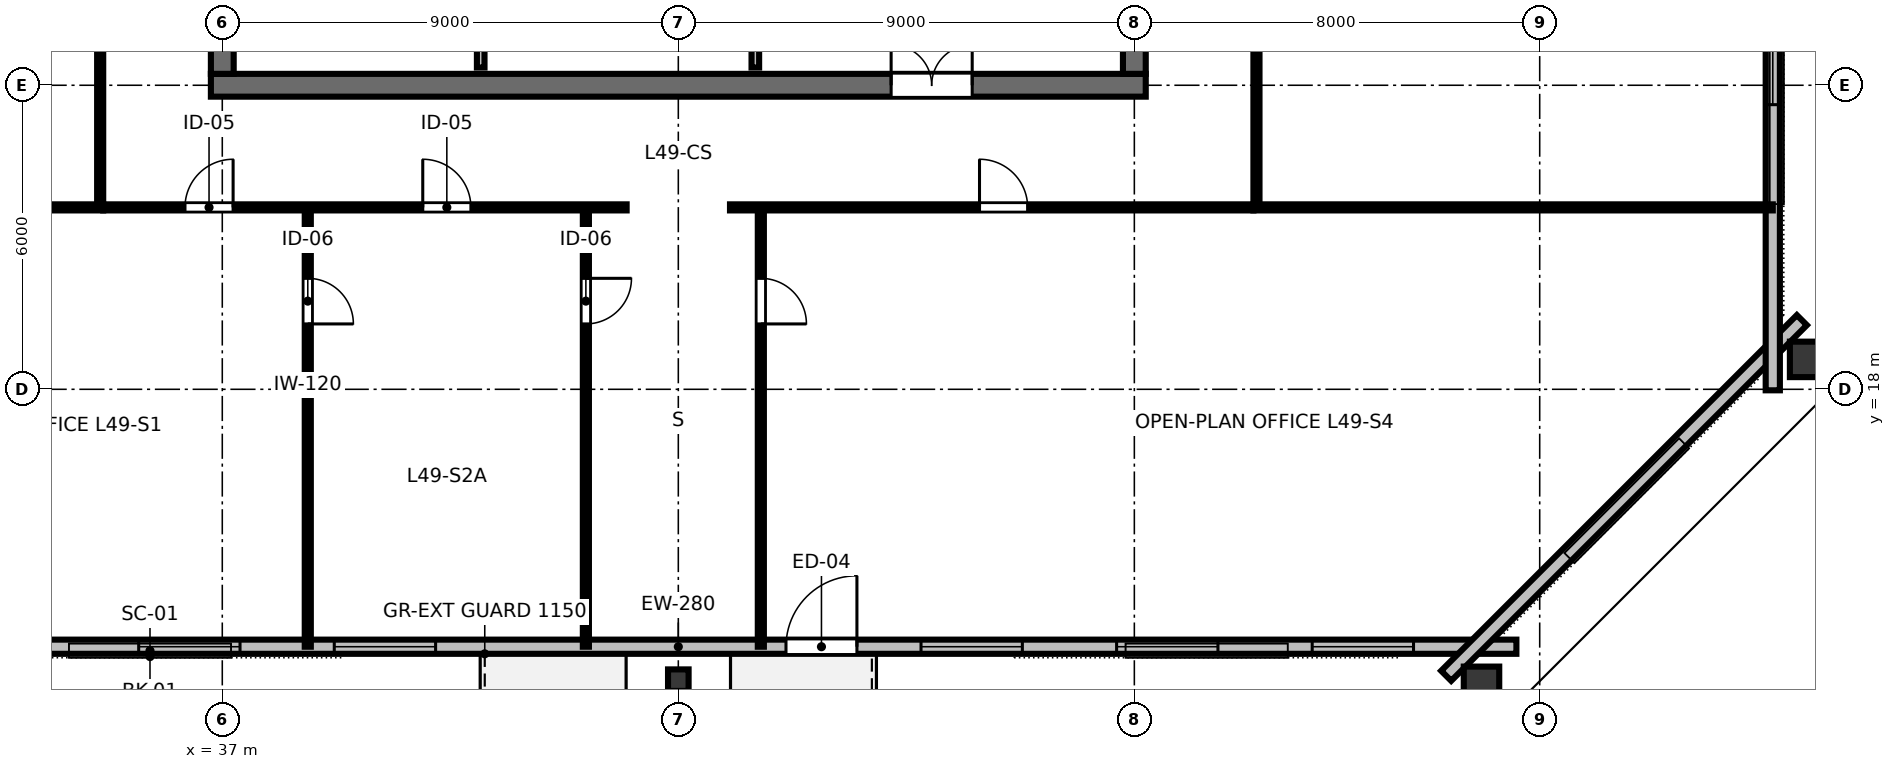
"""IFC4 building model, lengths in metres.
Left out: names, types, materials, properties, quantities, classifications, styles, units other than length and angle.
Written with IfcOpenShell. Run it as: python <this file> out.ifc"""

import sys

from ifc_helpers import new_model, si_unit, direction, frame, frame_2d, origin, origin_2d, place, context, subcontext, project, spatial, rectangle, hollow_rectangle, i_section, extrude, element, fill, save


model = new_model("IFC4")
c1 = context("Model", 3, precision=1e-05, world=origin(), true_north=direction((0.0, 1.0)))
c2 = subcontext(c1, "Body", "Model", "MODEL_VIEW")
j1 = project(units=[si_unit("LENGTHUNIT", "METRE"), si_unit("PLANEANGLEUNIT", "RADIAN")], contexts=[c1])
p1 = place(None, origin())
s1 = spatial("IfcSite", under=j1, at=p1, CompositionType="ELEMENT")
p2 = place(p1, origin())
s2 = spatial("IfcBuilding", under=s1, at=p2, CompositionType="ELEMENT")
p3 = place(p2, frame((0.0, 0.0, 187.8)))
s3 = spatial("IfcBuildingStorey", under=s2, at=p3, CompositionType="ELEMENT", Elevation=187.8)
p4 = place(p3, frame((36.775, 24.0, 0.0), z_axis=(0.0, 0.0, 1.0), x_axis=(1.0, 0.0, 0.0)))
e1 = element("IfcWall", 1, at=p4, inside=s3, PredefinedType="SHEAR", context=c2, shape_type="SweptSolid", body=[
    extrude(rectangle(XDim=18.45, YDim=0.45, at=frame_2d((9.225, 0.0))), origin(), (0.0, 0.0, 1.0), 3.36),
])
p5 = place(p4, frame((13.425, 0.0, 0.0)))
e2 = element("IfcOpeningElement", 2, at=p5, cuts=e1, PredefinedType="OPENING", context=c2, shape_type="SweptSolid", body=[
    extrude(rectangle(XDim=1.6, YDim=2.15, at=frame_2d((0.8, 1.075))), frame((0.0, 0.235, 0.0), z_axis=(0.0, -1.0, 0.0), x_axis=(1.0, 0.0, 0.0)), (0.0, 0.0, 1.0), 0.47),
])
p6 = place(p3, frame((37.0, 24.225, 0.0), z_axis=(0.0, 0.0, 1.0), x_axis=(0.0, 1.0, 0.0)))
e3 = element("IfcWall", 3, at=p6, inside=s3, PredefinedType="SHEAR", context=c2, shape_type="SweptSolid", body=[
    extrude(rectangle(XDim=15.55, YDim=0.45, at=frame_2d((7.775, 0.0))), origin(), (0.0, 0.0, 1.0), 3.36),
])
p7 = place(p6, frame((5.3, 0.0, 0.0)))
e4 = element("IfcOpeningElement", 4, at=p7, cuts=e3, PredefinedType="OPENING", context=c2, shape_type="SweptSolid", body=[
    extrude(rectangle(XDim=1.15, YDim=2.15, at=frame_2d((0.575, 1.075))), frame((0.0, 0.235, 0.0), z_axis=(0.0, -1.0, 0.0), x_axis=(1.0, 0.0, 0.0)), (0.0, 0.0, 1.0), 0.47),
])
p8 = place(p3, frame((55.0, 24.225, 0.0), z_axis=(0.0, 0.0, 1.0), x_axis=(0.0, 1.0, 0.0)))
e5 = element("IfcWall", 5, at=p8, inside=s3, PredefinedType="SHEAR", context=c2, shape_type="SweptSolid", body=[
    extrude(rectangle(XDim=15.55, YDim=0.45, at=frame_2d((7.775, 0.0))), origin(), (0.0, 0.0, 1.0), 3.36),
])
p9 = place(p8, frame((5.3, 0.0, 0.0)))
e6 = element("IfcOpeningElement", 6, at=p9, cuts=e5, PredefinedType="OPENING", context=c2, shape_type="SweptSolid", body=[
    extrude(rectangle(XDim=1.15, YDim=2.15, at=frame_2d((0.575, 1.075))), frame((0.0, 0.235, 0.0), z_axis=(0.0, -1.0, 0.0), x_axis=(1.0, 0.0, 0.0)), (0.0, 0.0, 1.0), 0.47),
])
p10 = place(p3, frame((46.0, 12.26, 0.0), z_axis=(0.0, 0.0, 1.0), x_axis=(1.0, 0.0, 0.0)))
e7 = element("IfcColumn", 7, at=p10, inside=s3, PredefinedType="COLUMN", context=c2, shape_type="SweptSolid", body=[
    extrude(i_section(OverallWidth=0.406, OverallDepth=0.425, WebThickness=0.033, FlangeThickness=0.052, FilletRadius=0.025, at=origin_2d()), origin(), (0.0, 0.0, 1.0), 3.373),
])
for number, where, z_axis, x_axis in (
    (8, (61.851, 12.103, 0.0), (0.0, 0.0, 1.0), (1.0, 0.0, 0.0)),
    (9, (68.363, 18.59, 0.0), (0.0, 0.0, 1.0), (0.0, 1.0, 0.0)),
):
    element("IfcColumn", number, at=place(p3, frame(where, z_axis=z_axis, x_axis=x_axis)), inside=s3, PredefinedType="COLUMN", context=c2, shape_type="SweptSolid", body=[
        extrude(hollow_rectangle(XDim=0.7, YDim=0.85, WallThickness=0.04, at=origin_2d()), origin(), (0.0, 0.0, 1.0), 3.373),
    ])
p11 = place(p3, frame((29.46, 12.92, 0.0), z_axis=(0.0, 0.0, 1.0), x_axis=(1.0, 0.0, 0.0)))
e10 = element("IfcWall", 10, at=p11, inside=s3, PredefinedType="STANDARD", context=c2, shape_type="SweptSolid", body=[
    extrude(rectangle(XDim=33.08, YDim=0.28, at=frame_2d((16.54, 0.0))), origin(), (0.0, 0.0, 1.0), 3.375),
])
p12 = place(p11, frame((18.665, 0.0, 0.0)))
e11 = element("IfcOpeningElement", 11, at=p12, cuts=e10, PredefinedType="OPENING", context=c2, shape_type="SweptSolid", body=[
    extrude(rectangle(XDim=1.4, YDim=2.15, at=frame_2d((0.7, 1.075))), frame((0.0, 0.15, 0.0), z_axis=(0.0, -1.0, 0.0), x_axis=(1.0, 0.0, 0.0)), (0.0, 0.0, 1.0), 0.3),
])
p13 = place(p11, frame((2.03, 0.0, 0.8)))
e12 = element("IfcOpeningElement", 12, at=p13, cuts=e10, PredefinedType="OPENING", context=c2, shape_type="SweptSolid", body=[
    extrude(rectangle(XDim=2.0, YDim=1.95, at=frame_2d((1.0, 0.975))), frame((0.0, 0.15, 0.0), z_axis=(0.0, -1.0, 0.0), x_axis=(1.0, 0.0, 0.0)), (0.0, 0.0, 1.0), 0.3),
])
p14 = place(p11, frame((5.89, 0.0, 0.8)))
e13 = element("IfcOpeningElement", 13, at=p14, cuts=e10, PredefinedType="OPENING", context=c2, shape_type="SweptSolid", body=[
    extrude(rectangle(XDim=2.0, YDim=1.95, at=frame_2d((1.0, 0.975))), frame((0.0, 0.15, 0.0), z_axis=(0.0, -1.0, 0.0), x_axis=(1.0, 0.0, 0.0)), (0.0, 0.0, 1.0), 0.3),
])
p15 = place(p11, frame((9.75, 0.0, 0.8)))
e14 = element("IfcOpeningElement", 14, at=p15, cuts=e10, PredefinedType="OPENING", context=c2, shape_type="SweptSolid", body=[
    extrude(rectangle(XDim=2.0, YDim=1.95, at=frame_2d((1.0, 0.975))), frame((0.0, 0.15, 0.0), z_axis=(0.0, -1.0, 0.0), x_axis=(1.0, 0.0, 0.0)), (0.0, 0.0, 1.0), 0.3),
])
p16 = place(p11, frame((21.33, 0.0, 0.8)))
e15 = element("IfcOpeningElement", 15, at=p16, cuts=e10, PredefinedType="OPENING", context=c2, shape_type="SweptSolid", body=[
    extrude(rectangle(XDim=2.0, YDim=1.95, at=frame_2d((1.0, 0.975))), frame((0.0, 0.15, 0.0), z_axis=(0.0, -1.0, 0.0), x_axis=(1.0, 0.0, 0.0)), (0.0, 0.0, 1.0), 0.3),
])
p17 = place(p11, frame((25.19, 0.0, 0.8)))
e16 = element("IfcOpeningElement", 16, at=p17, cuts=e10, PredefinedType="OPENING", context=c2, shape_type="SweptSolid", body=[
    extrude(rectangle(XDim=2.0, YDim=1.95, at=frame_2d((1.0, 0.975))), frame((0.0, 0.15, 0.0), z_axis=(0.0, -1.0, 0.0), x_axis=(1.0, 0.0, 0.0)), (0.0, 0.0, 1.0), 0.3),
])
p18 = place(p11, frame((29.05, 0.0, 0.8)))
e17 = element("IfcOpeningElement", 17, at=p18, cuts=e10, PredefinedType="OPENING", context=c2, shape_type="SweptSolid", body=[
    extrude(rectangle(XDim=2.0, YDim=1.95, at=frame_2d((1.0, 0.975))), frame((0.0, 0.15, 0.0), z_axis=(0.0, -1.0, 0.0), x_axis=(1.0, 0.0, 0.0)), (0.0, 0.0, 1.0), 0.3),
])
p19 = place(p3, frame((61.155, 12.346, 0.0), z_axis=(0.0, 0.0, 1.0), x_axis=(0.707106781187, 0.707106781187, 0.0)))
e18 = element("IfcWall", 18, at=p19, inside=s3, PredefinedType="STANDARD", context=c2, shape_type="SweptSolid", body=[
    extrude(rectangle(XDim=9.927, YDim=0.28, at=frame_2d((4.963, 0.0))), origin(), (0.0, 0.0, 1.0), 3.375),
])
p20 = place(p3, frame((67.6, 17.98, 0.0), z_axis=(0.0, 0.0, 1.0), x_axis=(0.0, 1.0, 0.0)))
e19 = element("IfcWall", 19, at=p20, inside=s3, PredefinedType="STANDARD", context=c2, shape_type="SweptSolid", body=[
    extrude(rectangle(XDim=28.04, YDim=0.28, at=frame_2d((14.02, 0.0))), origin(), (0.0, 0.0, 1.0), 3.375),
])
p21 = place(p20, frame((5.637, 0.0, 0.8)))
e20 = element("IfcOpeningElement", 20, at=p21, cuts=e19, PredefinedType="OPENING", context=c2, shape_type="SweptSolid", body=[
    extrude(rectangle(XDim=2.0, YDim=1.95, at=frame_2d((1.0, 0.975))), frame((0.0, 0.15, 0.0), z_axis=(0.0, -1.0, 0.0), x_axis=(1.0, 0.0, 0.0)), (0.0, 0.0, 1.0), 0.3),
])
p22 = place(p20, frame((9.329, 0.0, 0.8)))
e21 = element("IfcOpeningElement", 21, at=p22, cuts=e19, PredefinedType="OPENING", context=c2, shape_type="SweptSolid", body=[
    extrude(rectangle(XDim=2.0, YDim=1.95, at=frame_2d((1.0, 0.975))), frame((0.0, 0.15, 0.0), z_axis=(0.0, -1.0, 0.0), x_axis=(1.0, 0.0, 0.0)), (0.0, 0.0, 1.0), 0.3),
])
p23 = place(p20, frame((16.711, 0.0, 0.8)))
e22 = element("IfcOpeningElement", 22, at=p23, cuts=e19, PredefinedType="OPENING", context=c2, shape_type="SweptSolid", body=[
    extrude(rectangle(XDim=2.0, YDim=1.95, at=frame_2d((1.0, 0.975))), frame((0.0, 0.15, 0.0), z_axis=(0.0, -1.0, 0.0), x_axis=(1.0, 0.0, 0.0)), (0.0, 0.0, 1.0), 0.3),
])
p24 = place(p20, frame((20.403, 0.0, 0.8)))
e23 = element("IfcOpeningElement", 23, at=p24, cuts=e19, PredefinedType="OPENING", context=c2, shape_type="SweptSolid", body=[
    extrude(rectangle(XDim=2.0, YDim=1.95, at=frame_2d((1.0, 0.975))), frame((0.0, 0.15, 0.0), z_axis=(0.0, -1.0, 0.0), x_axis=(1.0, 0.0, 0.0)), (0.0, 0.0, 1.0), 0.3),
])
p25 = place(p3, frame((42.1, 24.35, 0.0), z_axis=(0.0, 0.0, 1.0), x_axis=(0.0, 1.0, 0.0)))
e24 = element("IfcWall", 24, at=p25, inside=s3, PredefinedType="PARTITIONING", context=c2, shape_type="SweptSolid", body=[
    extrude(rectangle(XDim=3.9, YDim=0.15, at=frame_2d((1.95, 0.0))), origin(), (0.0, 0.0, 1.0), 3.375),
])
p26 = place(p25, frame((1.5, 0.0, 0.0)))
e25 = element("IfcOpeningElement", 25, at=p26, cuts=e24, PredefinedType="OPENING", context=c2, shape_type="SweptSolid", body=[
    extrude(rectangle(XDim=0.9, YDim=2.15, at=frame_2d((0.45, 1.075))), frame((0.0, 0.085, 0.0), z_axis=(0.0, -1.0, 0.0), x_axis=(1.0, 0.0, 0.0)), (0.0, 0.0, 1.0), 0.17),
])
p27 = place(p3, frame((47.52, 24.35, 0.0), z_axis=(0.0, 0.0, 1.0), x_axis=(0.0, 1.0, 0.0)))
e26 = element("IfcWall", 26, at=p27, inside=s3, PredefinedType="PARTITIONING", context=c2, shape_type="SweptSolid", body=[
    extrude(rectangle(XDim=3.9, YDim=0.15, at=frame_2d((1.95, 0.0))), origin(), (0.0, 0.0, 1.0), 3.375),
])
p28 = place(p27, frame((0.35, 0.0, 0.0)))
e27 = element("IfcOpeningElement", 27, at=p28, cuts=e26, PredefinedType="OPENING", context=c2, shape_type="SweptSolid", body=[
    extrude(rectangle(XDim=0.9, YDim=2.15, at=frame_2d((0.45, 1.075))), frame((0.0, 0.085, 0.0), z_axis=(0.0, -1.0, 0.0), x_axis=(1.0, 0.0, 0.0)), (0.0, 0.0, 1.0), 0.17),
])
p29 = place(p3, frame((38.687, 21.59, 0.0), z_axis=(0.0, 0.0, 1.0), x_axis=(0.0, -1.0, 0.0)))
e28 = element("IfcWall", 28, at=p29, inside=s3, PredefinedType="PARTITIONING", context=c2, shape_type="SweptSolid", body=[
    extrude(rectangle(XDim=8.67, YDim=0.12, at=frame_2d((4.335, 0.0))), origin(), (0.0, 0.0, 1.0), 2.655),
])
p30 = place(p29, frame((1.4, 0.0, 0.0)))
e29 = element("IfcOpeningElement", 29, at=p30, cuts=e28, PredefinedType="OPENING", context=c2, shape_type="SweptSolid", body=[
    extrude(rectangle(XDim=0.9, YDim=2.15, at=frame_2d((0.45, 1.075))), frame((0.0, 0.07, 0.0), z_axis=(0.0, -1.0, 0.0), x_axis=(1.0, 0.0, 0.0)), (0.0, 0.0, 1.0), 0.14),
])
p31 = place(p3, frame((44.176, 21.59, 0.0), z_axis=(0.0, 0.0, 1.0), x_axis=(0.0, -1.0, 0.0)))
e30 = element("IfcWall", 30, at=p31, inside=s3, PredefinedType="PARTITIONING", context=c2, shape_type="SweptSolid", body=[
    extrude(rectangle(XDim=8.67, YDim=0.12, at=frame_2d((4.335, 0.0))), origin(), (0.0, 0.0, 1.0), 2.655),
])
p32 = place(p31, frame((1.4, 0.0, 0.0)))
e31 = element("IfcOpeningElement", 31, at=p32, cuts=e30, PredefinedType="OPENING", context=c2, shape_type="SweptSolid", body=[
    extrude(rectangle(XDim=0.9, YDim=2.15, at=frame_2d((0.45, 1.075))), frame((0.0, 0.07, 0.0), z_axis=(0.0, -1.0, 0.0), x_axis=(1.0, 0.0, 0.0)), (0.0, 0.0, 1.0), 0.14),
])
p33 = place(p3, frame((47.629, 21.59, 0.0), z_axis=(0.0, 0.0, 1.0), x_axis=(0.0, -1.0, 0.0)))
e32 = element("IfcWall", 32, at=p33, inside=s3, PredefinedType="PARTITIONING", context=c2, shape_type="SweptSolid", body=[
    extrude(rectangle(XDim=8.67, YDim=0.12, at=frame_2d((4.335, 0.0))), origin(), (0.0, 0.0, 1.0), 2.655),
])
p34 = place(p33, frame((1.4, 0.0, 0.0)))
e33 = element("IfcOpeningElement", 33, at=p34, cuts=e32, PredefinedType="OPENING", context=c2, shape_type="SweptSolid", body=[
    extrude(rectangle(XDim=0.9, YDim=2.15, at=frame_2d((0.45, 1.075))), frame((0.0, 0.07, 0.0), z_axis=(0.0, -1.0, 0.0), x_axis=(1.0, 0.0, 0.0)), (0.0, 0.0, 1.0), 0.14),
])
p35 = place(p3, frame((34.65, 21.59, 0.0), z_axis=(0.0, 0.0, 1.0), x_axis=(1.0, 0.0, 0.0)))
e34 = element("IfcWall", 34, at=p35, inside=s3, PredefinedType="PARTITIONING", context=c2, shape_type="SweptSolid", body=[
    extrude(rectangle(XDim=10.33, YDim=0.12, at=frame_2d((5.165, 0.0))), origin(), (0.0, 0.0, 1.0), 2.655),
])
p36 = place(p35, frame((1.614, 0.0, 0.0)))
e35 = element("IfcOpeningElement", 35, at=p36, cuts=e34, PredefinedType="OPENING", context=c2, shape_type="SweptSolid", body=[
    extrude(rectangle(XDim=0.95, YDim=2.15, at=frame_2d((0.475, 1.075))), frame((0.0, 0.07, 0.0), z_axis=(0.0, -1.0, 0.0), x_axis=(1.0, 0.0, 0.0)), (0.0, 0.0, 1.0), 0.14),
])
p37 = place(p35, frame((6.306, 0.0, 0.0)))
e36 = element("IfcOpeningElement", 36, at=p37, cuts=e34, PredefinedType="OPENING", context=c2, shape_type="SweptSolid", body=[
    extrude(rectangle(XDim=0.95, YDim=2.15, at=frame_2d((0.475, 1.075))), frame((0.0, 0.07, 0.0), z_axis=(0.0, -1.0, 0.0), x_axis=(1.0, 0.0, 0.0)), (0.0, 0.0, 1.0), 0.14),
])
p38 = place(p3, frame((47.02, 21.59, 0.0), z_axis=(0.0, 0.0, 1.0), x_axis=(1.0, 0.0, 0.0)))
e37 = element("IfcWall", 37, at=p38, inside=s3, PredefinedType="PARTITIONING", context=c2, shape_type="SweptSolid", body=[
    extrude(rectangle(XDim=10.33, YDim=0.12, at=frame_2d((5.165, 0.0))), origin(), (0.0, 0.0, 1.0), 2.655),
])
p39 = place(p38, frame((4.924, 0.0, 0.0)))
e38 = element("IfcOpeningElement", 38, at=p39, cuts=e37, PredefinedType="OPENING", context=c2, shape_type="SweptSolid", body=[
    extrude(rectangle(XDim=0.95, YDim=2.15, at=frame_2d((0.475, 1.075))), frame((0.0, 0.07, 0.0), z_axis=(0.0, -1.0, 0.0), x_axis=(1.0, 0.0, 0.0)), (0.0, 0.0, 1.0), 0.14),
])
p40 = place(p3, frame((34.59, 21.65, 0.0), z_axis=(0.0, 0.0, 1.0), x_axis=(0.0, 1.0, 0.0)))
e39 = element("IfcWall", 39, at=p40, inside=s3, PredefinedType="PARTITIONING", context=c2, shape_type="SweptSolid", body=[
    extrude(rectangle(XDim=20.7, YDim=0.12, at=frame_2d((10.35, 0.0))), origin(), (0.0, 0.0, 1.0), 2.655),
])
p41 = place(p40, frame((6.214, 0.0, 0.0)))
e40 = element("IfcOpeningElement", 40, at=p41, cuts=e39, PredefinedType="OPENING", context=c2, shape_type="SweptSolid", body=[
    extrude(rectangle(XDim=0.95, YDim=2.15, at=frame_2d((0.475, 1.075))), frame((0.0, 0.07, 0.0), z_axis=(0.0, -1.0, 0.0), x_axis=(1.0, 0.0, 0.0)), (0.0, 0.0, 1.0), 0.14),
])
p42 = place(p40, frame((16.365, 0.0, 0.0)))
e41 = element("IfcOpeningElement", 41, at=p42, cuts=e39, PredefinedType="OPENING", context=c2, shape_type="SweptSolid", body=[
    extrude(rectangle(XDim=0.95, YDim=2.15, at=frame_2d((0.475, 1.075))), frame((0.0, 0.07, 0.0), z_axis=(0.0, -1.0, 0.0), x_axis=(1.0, 0.0, 0.0)), (0.0, 0.0, 1.0), 0.14),
])
p43 = place(p3, frame((57.41, 21.65, 0.0), z_axis=(0.0, 0.0, 1.0), x_axis=(0.0, 1.0, 0.0)))
e42 = element("IfcWall", 42, at=p43, inside=s3, PredefinedType="PARTITIONING", context=c2, shape_type="SweptSolid", body=[
    extrude(rectangle(XDim=20.7, YDim=0.12, at=frame_2d((10.35, 0.0))), origin(), (0.0, 0.0, 1.0), 2.655),
])
p44 = place(p43, frame((9.875, 0.0, 0.0)))
e43 = element("IfcOpeningElement", 43, at=p44, cuts=e42, PredefinedType="OPENING", context=c2, shape_type="SweptSolid", body=[
    extrude(rectangle(XDim=0.95, YDim=2.15, at=frame_2d((0.475, 1.075))), frame((0.0, 0.07, 0.0), z_axis=(0.0, -1.0, 0.0), x_axis=(1.0, 0.0, 0.0)), (0.0, 0.0, 1.0), 0.14),
])
for number, where, z_axis, x_axis in (
    (44, (34.65, 21.59, 0.0), (0.0, 0.0, 1.0), (-1.0, 0.0, 0.0)),
    (45, (57.35, 21.59, 0.0), (0.0, 0.0, 1.0), (1.0, 0.0, 0.0)),
):
    element("IfcWall", number, at=place(p3, frame(where, z_axis=z_axis, x_axis=x_axis)), inside=s3, PredefinedType="PARTITIONING", context=c2, shape_type="SweptSolid", body=[
        extrude(rectangle(XDim=10.25, YDim=0.12, at=frame_2d((5.125, 0.0))), origin(), (0.0, 0.0, 1.0), 2.655),
    ])
p45 = place(p12, origin())
e46 = element("IfcDoor", 46, at=p45, inside=s3, OperationType="SINGLE_SWING_RIGHT", PredefinedType="DOOR", context=c2, shape_type="SweptSolid", body=[
    extrude(rectangle(XDim=1.4, YDim=2.15, at=frame_2d((0.7, 1.075))), frame((0.0, 0.025, 0.0), z_axis=(0.0, -1.0, 0.0), x_axis=(1.0, 0.0, 0.0)), (0.0, 0.0, 1.0), 0.05),
])
fill(e11, e46)
p46 = place(p14, origin())
e47 = element("IfcWindow", 47, at=p46, inside=s3, PartitioningType="SINGLE_PANEL", PredefinedType="WINDOW", context=c2, shape_type="SweptSolid", body=[
    extrude(rectangle(XDim=2.0, YDim=1.95, at=frame_2d((1.0, 0.975))), frame((0.0, 0.03, 0.0), z_axis=(0.0, -1.0, 0.0), x_axis=(1.0, 0.0, 0.0)), (0.0, 0.0, 1.0), 0.06),
])
fill(e13, e47)
p47 = place(p15, origin())
e48 = element("IfcWindow", 48, at=p47, inside=s3, PartitioningType="SINGLE_PANEL", PredefinedType="WINDOW", context=c2, shape_type="SweptSolid", body=[
    extrude(rectangle(XDim=2.0, YDim=1.95, at=frame_2d((1.0, 0.975))), frame((0.0, 0.03, 0.0), z_axis=(0.0, -1.0, 0.0), x_axis=(1.0, 0.0, 0.0)), (0.0, 0.0, 1.0), 0.06),
])
fill(e14, e48)
p48 = place(p16, origin())
e49 = element("IfcWindow", 49, at=p48, inside=s3, PartitioningType="SINGLE_PANEL", PredefinedType="WINDOW", context=c2, shape_type="SweptSolid", body=[
    extrude(rectangle(XDim=2.0, YDim=1.95, at=frame_2d((1.0, 0.975))), frame((0.0, 0.03, 0.0), z_axis=(0.0, -1.0, 0.0), x_axis=(1.0, 0.0, 0.0)), (0.0, 0.0, 1.0), 0.06),
])
fill(e15, e49)
p49 = place(p17, origin())
e50 = element("IfcWindow", 50, at=p49, inside=s3, PartitioningType="SINGLE_PANEL", PredefinedType="WINDOW", context=c2, shape_type="SweptSolid", body=[
    extrude(rectangle(XDim=2.0, YDim=1.95, at=frame_2d((1.0, 0.975))), frame((0.0, 0.03, 0.0), z_axis=(0.0, -1.0, 0.0), x_axis=(1.0, 0.0, 0.0)), (0.0, 0.0, 1.0), 0.06),
])
fill(e16, e50)
p50 = place(p18, origin())
e51 = element("IfcWindow", 51, at=p50, inside=s3, PartitioningType="SINGLE_PANEL", PredefinedType="WINDOW", context=c2, shape_type="SweptSolid", body=[
    extrude(rectangle(XDim=2.0, YDim=1.95, at=frame_2d((1.0, 0.975))), frame((0.0, 0.03, 0.0), z_axis=(0.0, -1.0, 0.0), x_axis=(1.0, 0.0, 0.0)), (0.0, 0.0, 1.0), 0.06),
])
fill(e17, e51)
p51 = place(p21, origin())
e52 = element("IfcWindow", 52, at=p51, inside=s3, PartitioningType="SINGLE_PANEL", PredefinedType="WINDOW", context=c2, shape_type="SweptSolid", body=[
    extrude(rectangle(XDim=2.0, YDim=1.95, at=frame_2d((1.0, 0.975))), frame((0.0, 0.03, 0.0), z_axis=(0.0, -1.0, 0.0), x_axis=(1.0, 0.0, 0.0)), (0.0, 0.0, 1.0), 0.06),
])
fill(e20, e52)
p52 = place(p5, origin())
e53 = element("IfcDoor", 53, at=p52, inside=s3, OperationType="DOUBLE_DOOR_SINGLE_SWING", PredefinedType="DOOR", context=c2, shape_type="SweptSolid", body=[
    extrude(rectangle(XDim=1.6, YDim=2.15, at=frame_2d((0.8, 1.075))), frame((0.0, 0.025, 0.0), z_axis=(0.0, -1.0, 0.0), x_axis=(1.0, 0.0, 0.0)), (0.0, 0.0, 1.0), 0.05),
])
fill(e2, e53)
p53 = place(p30, origin())
e54 = element("IfcDoor", 54, at=p53, inside=s3, OperationType="SINGLE_SWING_RIGHT", PredefinedType="DOOR", context=c2, shape_type="SweptSolid", body=[
    extrude(rectangle(XDim=0.9, YDim=2.15, at=frame_2d((0.45, 1.075))), frame((0.0, 0.025, 0.0), z_axis=(0.0, -1.0, 0.0), x_axis=(1.0, 0.0, 0.0)), (0.0, 0.0, 1.0), 0.05),
])
fill(e29, e54)
p54 = place(p32, origin())
e55 = element("IfcDoor", 55, at=p54, inside=s3, OperationType="SINGLE_SWING_LEFT", PredefinedType="DOOR", context=c2, shape_type="SweptSolid", body=[
    extrude(rectangle(XDim=0.9, YDim=2.15, at=frame_2d((0.45, 1.075))), frame((0.0, 0.025, 0.0), z_axis=(0.0, -1.0, 0.0), x_axis=(1.0, 0.0, 0.0)), (0.0, 0.0, 1.0), 0.05),
])
fill(e31, e55)
p55 = place(p34, origin())
e56 = element("IfcDoor", 56, at=p55, inside=s3, OperationType="SINGLE_SWING_RIGHT", PredefinedType="DOOR", context=c2, shape_type="SweptSolid", body=[
    extrude(rectangle(XDim=0.9, YDim=2.15, at=frame_2d((0.45, 1.075))), frame((0.0, 0.025, 0.0), z_axis=(0.0, -1.0, 0.0), x_axis=(1.0, 0.0, 0.0)), (0.0, 0.0, 1.0), 0.05),
])
fill(e33, e56)
p56 = place(p36, origin())
e57 = element("IfcDoor", 57, at=p56, inside=s3, OperationType="SINGLE_SWING_RIGHT", PredefinedType="DOOR", context=c2, shape_type="SweptSolid", body=[
    extrude(rectangle(XDim=0.95, YDim=2.15, at=frame_2d((0.475, 1.075))), frame((0.0, 0.025, 0.0), z_axis=(0.0, -1.0, 0.0), x_axis=(1.0, 0.0, 0.0)), (0.0, 0.0, 1.0), 0.05),
])
fill(e35, e57)
p57 = place(p37, origin())
e58 = element("IfcDoor", 58, at=p57, inside=s3, OperationType="SINGLE_SWING_LEFT", PredefinedType="DOOR", context=c2, shape_type="SweptSolid", body=[
    extrude(rectangle(XDim=0.95, YDim=2.15, at=frame_2d((0.475, 1.075))), frame((0.0, 0.025, 0.0), z_axis=(0.0, -1.0, 0.0), x_axis=(1.0, 0.0, 0.0)), (0.0, 0.0, 1.0), 0.05),
])
fill(e36, e58)
p58 = place(p39, origin())
e59 = element("IfcDoor", 59, at=p58, inside=s3, OperationType="SINGLE_SWING_LEFT", PredefinedType="DOOR", context=c2, shape_type="SweptSolid", body=[
    extrude(rectangle(XDim=0.95, YDim=2.15, at=frame_2d((0.475, 1.075))), frame((0.0, 0.025, 0.0), z_axis=(0.0, -1.0, 0.0), x_axis=(1.0, 0.0, 0.0)), (0.0, 0.0, 1.0), 0.05),
])
fill(e38, e59)
save(model, sys.argv[1])
